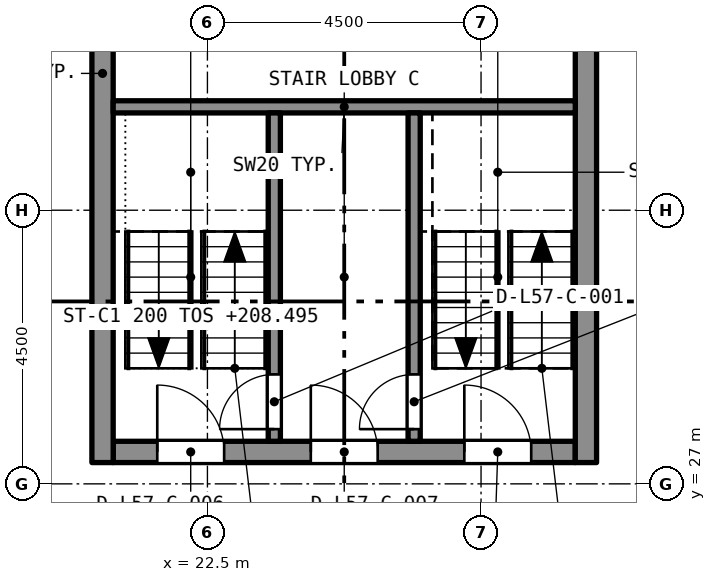
"""IFC4 building model, lengths in metres.
Left out: names, types, materials, properties, quantities, classifications, styles, units other than length and angle.
Written with IfcOpenShell. Run it as: python <this file> out.ifc"""

import sys

from ifc_helpers import new_model, si_unit, direction, frame, frame_2d, origin, place, context, subcontext, project, spatial, rectangle, extrude, element, fill, save


model = new_model("IFC4")
c1 = context("Model", 3, precision=1e-05, world=origin(), true_north=direction((0.0, 1.0)))
c2 = subcontext(c1, "Body", "Model", "MODEL_VIEW")
j1 = project(units=[si_unit("LENGTHUNIT", "METRE"), si_unit("PLANEANGLEUNIT", "RADIAN")], contexts=[c1])
p1 = place(None, origin())
s1 = spatial("IfcSite", under=j1, at=p1, CompositionType="ELEMENT")
p2 = place(p1, origin())
s2 = spatial("IfcBuilding", under=s1, at=p2, CompositionType="ELEMENT")
p3 = place(p2, frame((0.0, 0.0, 206.895)))
s3 = spatial("IfcBuildingStorey", under=s2, at=p3, CompositionType="ELEMENT", Elevation=206.895)
p4 = place(p3, frame((20.95, 27.525, 0.0), z_axis=(0.0, 0.0, 1.0), x_axis=(1.0, 0.0, 0.0)))
e1 = element("IfcWall", 1, at=p4, inside=s3, PredefinedType="SOLIDWALL", context=c2, shape_type="SweptSolid", body=[
    extrude(rectangle(XDim=7.6, YDim=0.35, at=frame_2d((3.8, 0.0))), origin(), (0.0, 0.0, 1.0), 3.2),
])
p5 = place(p4, frame((0.725, 0.0, 0.0)))
e2 = element("IfcOpeningElement", 2, at=p5, cuts=e1, PredefinedType="OPENING", context=c2, shape_type="SweptSolid", body=[
    extrude(rectangle(XDim=1.1, YDim=2.1, at=frame_2d((0.55, 1.05))), frame((0.0, 0.185, 0.0), z_axis=(0.0, -1.0, 0.0), x_axis=(1.0, 0.0, 0.0)), (0.0, 0.0, 1.0), 0.37),
])
p6 = place(p4, frame((3.25, 0.0, 0.0)))
e3 = element("IfcOpeningElement", 3, at=p6, cuts=e1, PredefinedType="OPENING", context=c2, shape_type="SweptSolid", body=[
    extrude(rectangle(XDim=1.1, YDim=2.1, at=frame_2d((0.55, 1.05))), frame((0.0, 0.185, 0.0), z_axis=(0.0, -1.0, 0.0), x_axis=(1.0, 0.0, 0.0)), (0.0, 0.0, 1.0), 0.37),
])
p7 = place(p4, frame((5.775, 0.0, 0.0)))
e4 = element("IfcOpeningElement", 4, at=p7, cuts=e1, PredefinedType="OPENING", context=c2, shape_type="SweptSolid", body=[
    extrude(rectangle(XDim=1.1, YDim=2.1, at=frame_2d((0.55, 1.05))), frame((0.0, 0.185, 0.0), z_axis=(0.0, -1.0, 0.0), x_axis=(1.0, 0.0, 0.0)), (0.0, 0.0, 1.0), 0.37),
])
p8 = place(p3, frame((20.775, 27.35, 0.0), z_axis=(0.0, 0.0, 1.0), x_axis=(0.0, 1.0, 0.0)))
e5 = element("IfcWall", 5, at=p8, inside=s3, PredefinedType="SOLIDWALL", context=c2, shape_type="SweptSolid", body=[
    extrude(rectangle(XDim=12.8, YDim=0.35, at=frame_2d((6.4, 0.0))), origin(), (0.0, 0.0, 1.0), 3.2),
])
p9 = place(p8, frame((8.6, 0.0, 0.0)))
e6 = element("IfcOpeningElement", 6, at=p9, cuts=e5, PredefinedType="OPENING", context=c2, shape_type="SweptSolid", body=[
    extrude(rectangle(XDim=1.2, YDim=2.1, at=frame_2d((0.6, 1.05))), frame((0.0, 0.185, 0.0), z_axis=(0.0, -1.0, 0.0), x_axis=(1.0, 0.0, 0.0)), (0.0, 0.0, 1.0), 0.37),
])
p10 = place(p3, frame((28.725, 27.35, 0.0), z_axis=(0.0, 0.0, 1.0), x_axis=(0.0, 1.0, 0.0)))
e7 = element("IfcWall", 7, at=p10, inside=s3, PredefinedType="SOLIDWALL", context=c2, shape_type="SweptSolid", body=[
    extrude(rectangle(XDim=12.8, YDim=0.35, at=frame_2d((6.4, 0.0))), origin(), (0.0, 0.0, 1.0), 3.2),
])
p11 = place(p10, frame((8.6, 0.0, 0.0)))
e8 = element("IfcOpeningElement", 8, at=p11, cuts=e7, PredefinedType="OPENING", context=c2, shape_type="SweptSolid", body=[
    extrude(rectangle(XDim=1.2, YDim=2.1, at=frame_2d((0.6, 1.05))), frame((0.0, 0.185, 0.0), z_axis=(0.0, -1.0, 0.0), x_axis=(1.0, 0.0, 0.0)), (0.0, 0.0, 1.0), 0.37),
])
p12 = place(p3, frame((20.95, 33.2, 0.0), z_axis=(0.0, 0.0, 1.0), x_axis=(1.0, 0.0, 0.0)))
e9 = element("IfcWall", 9, at=p12, inside=s3, PredefinedType="SOLIDWALL", context=c2, shape_type="SweptSolid", body=[
    extrude(rectangle(XDim=7.6, YDim=0.2, at=frame_2d((3.8, 0.0))), origin(), (0.0, 0.0, 1.0), 2.9),
])
p13 = place(p3, frame((23.6, 27.7, 0.0), z_axis=(0.0, 0.0, 1.0), x_axis=(0.0, 1.0, 0.0)))
e10 = element("IfcWall", 10, at=p13, inside=s3, PredefinedType="SOLIDWALL", context=c2, shape_type="SweptSolid", body=[
    extrude(rectangle(XDim=5.4, YDim=0.2, at=frame_2d((2.7, 0.0))), origin(), (0.0, 0.0, 1.0), 2.9),
])
p14 = place(p13, frame((0.2, 0.0, 0.0)))
e11 = element("IfcOpeningElement", 11, at=p14, cuts=e10, PredefinedType="OPENING", context=c2, shape_type="SweptSolid", body=[
    extrude(rectangle(XDim=0.9, YDim=2.1, at=frame_2d((0.45, 1.05))), frame((0.0, 0.11, 0.0), z_axis=(0.0, -1.0, 0.0), x_axis=(1.0, 0.0, 0.0)), (0.0, 0.0, 1.0), 0.22),
])
p15 = place(p3, frame((25.9, 27.7, 0.0), z_axis=(0.0, 0.0, 1.0), x_axis=(0.0, 1.0, 0.0)))
e12 = element("IfcWall", 12, at=p15, inside=s3, PredefinedType="SOLIDWALL", context=c2, shape_type="SweptSolid", body=[
    extrude(rectangle(XDim=5.4, YDim=0.2, at=frame_2d((2.7, 0.0))), origin(), (0.0, 0.0, 1.0), 2.9),
])
p16 = place(p15, frame((0.2, 0.0, 0.0)))
e13 = element("IfcOpeningElement", 13, at=p16, cuts=e12, PredefinedType="OPENING", context=c2, shape_type="SweptSolid", body=[
    extrude(rectangle(XDim=0.9, YDim=2.1, at=frame_2d((0.45, 1.05))), frame((0.0, 0.11, 0.0), z_axis=(0.0, -1.0, 0.0), x_axis=(1.0, 0.0, 0.0)), (0.0, 0.0, 1.0), 0.22),
])
p17 = place(p14, origin())
e14 = element("IfcDoor", 14, at=p17, inside=s3, OperationType="SINGLE_SWING_LEFT", PredefinedType="DOOR", context=c2, shape_type="SweptSolid", body=[
    extrude(rectangle(XDim=0.9, YDim=2.1, at=frame_2d((0.45, 1.05))), frame((0.0, 0.025, 0.0), z_axis=(0.0, -1.0, 0.0), x_axis=(1.0, 0.0, 0.0)), (0.0, 0.0, 1.0), 0.05),
])
fill(e11, e14)
p18 = place(p16, origin())
e15 = element("IfcDoor", 15, at=p18, inside=s3, OperationType="SINGLE_SWING_LEFT", PredefinedType="DOOR", context=c2, shape_type="SweptSolid", body=[
    extrude(rectangle(XDim=0.9, YDim=2.1, at=frame_2d((0.45, 1.05))), frame((0.0, 0.025, 0.0), z_axis=(0.0, -1.0, 0.0), x_axis=(1.0, 0.0, 0.0)), (0.0, 0.0, 1.0), 0.05),
])
fill(e13, e15)
p19 = place(p5, origin())
e16 = element("IfcDoor", 16, at=p19, inside=s3, OperationType="SINGLE_SWING_LEFT", PredefinedType="DOOR", context=c2, shape_type="SweptSolid", body=[
    extrude(rectangle(XDim=1.1, YDim=2.1, at=frame_2d((0.55, 1.05))), frame((0.0, 0.025, 0.0), z_axis=(0.0, -1.0, 0.0), x_axis=(1.0, 0.0, 0.0)), (0.0, 0.0, 1.0), 0.05),
])
fill(e2, e16)
p20 = place(p6, origin())
e17 = element("IfcDoor", 17, at=p20, inside=s3, OperationType="SINGLE_SWING_LEFT", PredefinedType="DOOR", context=c2, shape_type="SweptSolid", body=[
    extrude(rectangle(XDim=1.1, YDim=2.1, at=frame_2d((0.55, 1.05))), frame((0.0, 0.025, 0.0), z_axis=(0.0, -1.0, 0.0), x_axis=(1.0, 0.0, 0.0)), (0.0, 0.0, 1.0), 0.05),
])
fill(e3, e17)
p21 = place(p7, origin())
e18 = element("IfcDoor", 18, at=p21, inside=s3, OperationType="SINGLE_SWING_LEFT", PredefinedType="DOOR", context=c2, shape_type="SweptSolid", body=[
    extrude(rectangle(XDim=1.1, YDim=2.1, at=frame_2d((0.55, 1.05))), frame((0.0, 0.025, 0.0), z_axis=(0.0, -1.0, 0.0), x_axis=(1.0, 0.0, 0.0)), (0.0, 0.0, 1.0), 0.05),
])
fill(e4, e18)
save(model, sys.argv[1])
